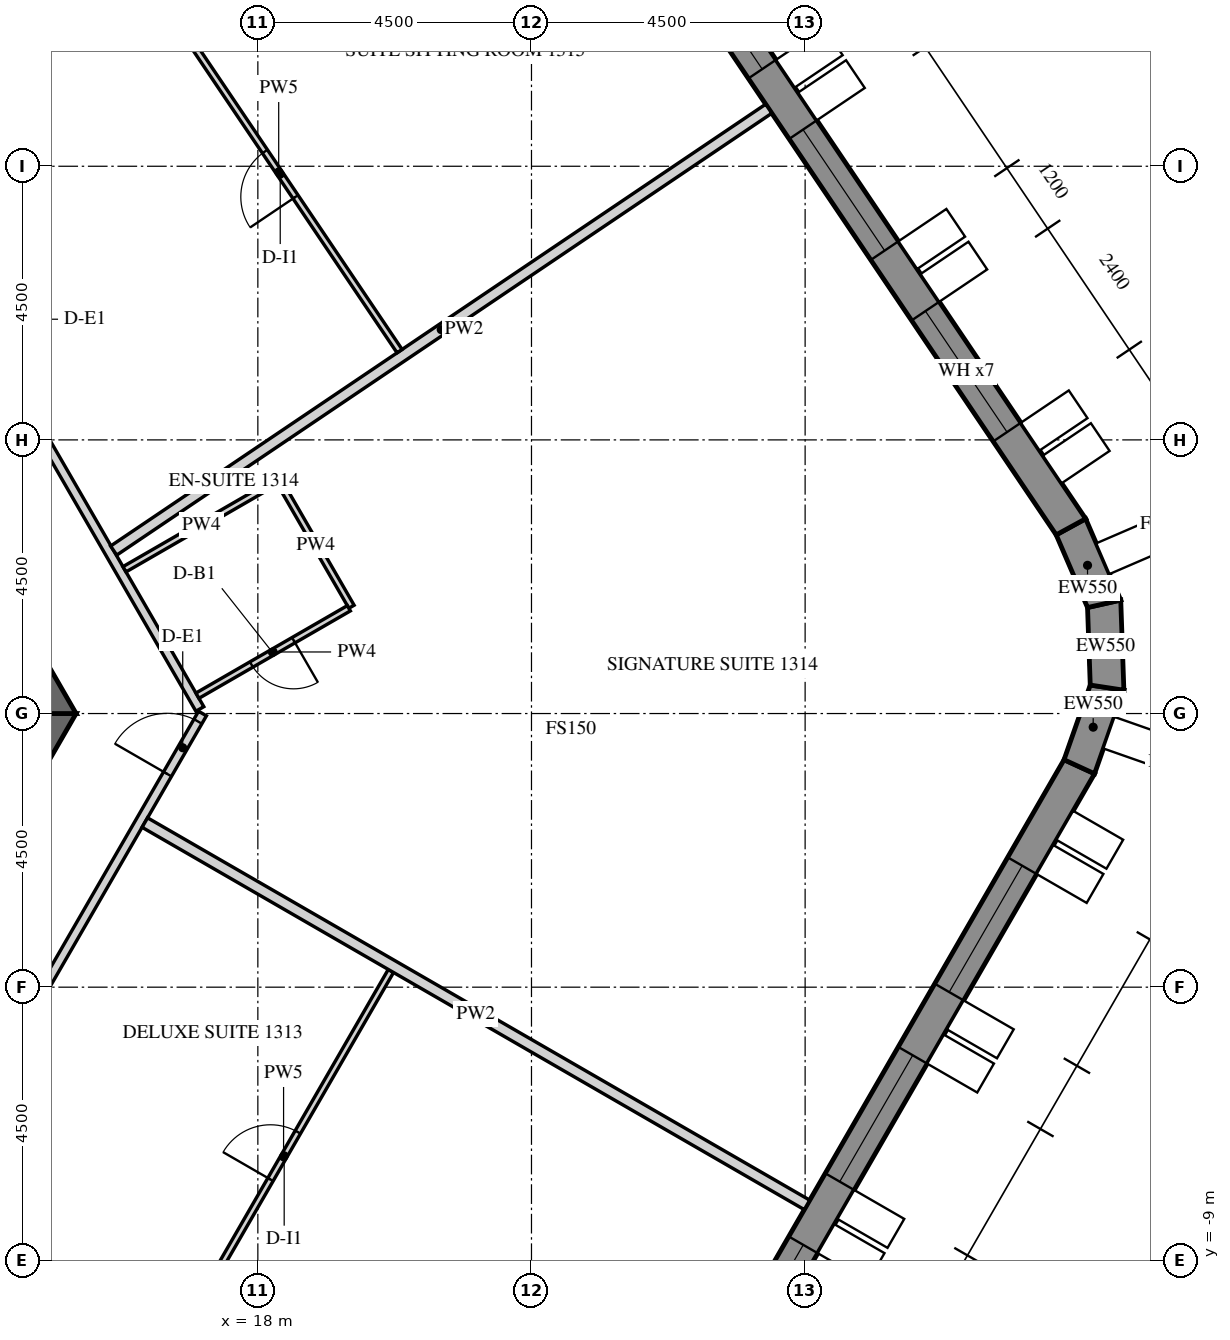
"""IFC4 building model, lengths in metres.
Left out: names, types, materials, properties, quantities, classifications, styles, units other than length and angle.
Written with IfcOpenShell. Run it as: python <this file> out.ifc"""

import sys

from ifc_helpers import new_model, si_unit, direction, frame, frame_2d, origin, place, context, subcontext, project, spatial, polyline, rectangle, outline, extrude, element, fill, save


model = new_model("IFC4")
c1 = context("Model", 3, precision=1e-05, world=origin(), true_north=direction((0.0, 1.0)))
c2 = subcontext(c1, "Body", "Model", "MODEL_VIEW")
j1 = project(units=[si_unit("LENGTHUNIT", "METRE"), si_unit("PLANEANGLEUNIT", "RADIAN")], contexts=[c1])
p1 = place(None, origin())
s1 = spatial("IfcSite", under=j1, at=p1, CompositionType="ELEMENT")
p2 = place(p1, origin())
s2 = spatial("IfcBuilding", under=s1, at=p2, CompositionType="ELEMENT")
p3 = place(p2, frame((0.0, 0.0, 176.1)))
s3 = spatial("IfcBuildingStorey", under=s2, at=p3, CompositionType="ELEMENT", Elevation=176.1)
p4 = place(p3, frame((17.63, -24.914, -0.15), z_axis=(0.0, 0.0, 1.0), x_axis=(0.499998569178, 0.866026229868, 0.0)))
e1 = element("IfcWall", 1, at=p4, inside=s3, PredefinedType="SOLIDWALL", context=c2, shape_type="SweptSolid", body=[
    extrude(outline(polyline([(-0.022, -0.275), (27.783, -0.275), (27.732, 0.275), (0.022, 0.275), (-0.022, -0.275)])), origin(), (0.0, 0.0, 1.0), 3.9),
])
p5 = place(p4, frame((1.879, 0.0, 1.05)))
e2 = element("IfcOpeningElement", 2, at=p5, cuts=e1, PredefinedType="OPENING", context=c2, shape_type="SweptSolid", body=[
    extrude(rectangle(XDim=2.4, YDim=2.4, at=frame_2d((1.2, 1.2))), frame((0.0, 0.285, 0.0), z_axis=(0.0, -1.0, 0.0), x_axis=(1.0, 0.0, 0.0)), (0.0, 0.0, 1.0), 0.57),
])
p6 = place(p4, frame((5.479, 0.0, 1.05)))
e3 = element("IfcOpeningElement", 3, at=p6, cuts=e1, PredefinedType="OPENING", context=c2, shape_type="SweptSolid", body=[
    extrude(rectangle(XDim=2.4, YDim=2.4, at=frame_2d((1.2, 1.2))), frame((0.0, 0.285, 0.0), z_axis=(0.0, -1.0, 0.0), x_axis=(1.0, 0.0, 0.0)), (0.0, 0.0, 1.0), 0.57),
])
p7 = place(p4, frame((9.079, 0.0, 1.05)))
e4 = element("IfcOpeningElement", 4, at=p7, cuts=e1, PredefinedType="OPENING", context=c2, shape_type="SweptSolid", body=[
    extrude(rectangle(XDim=2.4, YDim=2.4, at=frame_2d((1.2, 1.2))), frame((0.0, 0.285, 0.0), z_axis=(0.0, -1.0, 0.0), x_axis=(1.0, 0.0, 0.0)), (0.0, 0.0, 1.0), 0.57),
])
p8 = place(p4, frame((12.679, 0.0, 1.05)))
e5 = element("IfcOpeningElement", 5, at=p8, cuts=e1, PredefinedType="OPENING", context=c2, shape_type="SweptSolid", body=[
    extrude(rectangle(XDim=2.4, YDim=2.4, at=frame_2d((1.2, 1.2))), frame((0.0, 0.285, 0.0), z_axis=(0.0, -1.0, 0.0), x_axis=(1.0, 0.0, 0.0)), (0.0, 0.0, 1.0), 0.57),
])
p9 = place(p4, frame((16.279, 0.0, 1.05)))
e6 = element("IfcOpeningElement", 6, at=p9, cuts=e1, PredefinedType="OPENING", context=c2, shape_type="SweptSolid", body=[
    extrude(rectangle(XDim=2.4, YDim=2.4, at=frame_2d((1.2, 1.2))), frame((0.0, 0.285, 0.0), z_axis=(0.0, -1.0, 0.0), x_axis=(1.0, 0.0, 0.0)), (0.0, 0.0, 1.0), 0.57),
])
p10 = place(p4, frame((19.879, 0.0, 1.05)))
e7 = element("IfcOpeningElement", 7, at=p10, cuts=e1, PredefinedType="OPENING", context=c2, shape_type="SweptSolid", body=[
    extrude(rectangle(XDim=2.4, YDim=2.4, at=frame_2d((1.2, 1.2))), frame((0.0, 0.285, 0.0), z_axis=(0.0, -1.0, 0.0), x_axis=(1.0, 0.0, 0.0)), (0.0, 0.0, 1.0), 0.57),
])
p11 = place(p4, frame((23.479, 0.0, 1.05)))
e8 = element("IfcOpeningElement", 8, at=p11, cuts=e1, PredefinedType="OPENING", context=c2, shape_type="SweptSolid", body=[
    extrude(rectangle(XDim=2.4, YDim=2.4, at=frame_2d((1.2, 1.2))), frame((0.0, 0.285, 0.0), z_axis=(0.0, -1.0, 0.0), x_axis=(1.0, 0.0, 0.0)), (0.0, 0.0, 1.0), 0.57),
])
p12 = place(p3, frame((31.509, -0.875, -0.15), z_axis=(0.0, 0.0, 1.0), x_axis=(0.33111537203, 0.943590276765, 0.0)))
e9 = element("IfcWall", 9, at=p12, inside=s3, PredefinedType="SOLIDWALL", context=c2, shape_type="SweptSolid", body=[
    extrude(outline(polyline([(-0.026, -0.275), (1.431, -0.275), (1.327, 0.275), (0.026, 0.275), (-0.026, -0.275)])), origin(), (0.0, 0.0, 1.0), 3.9),
])
p13 = place(p3, frame((31.966, 0.426, -0.15), z_axis=(0.0, 0.0, 1.0), x_axis=(-0.034876908462, 0.999391615562, 0.0)))
e10 = element("IfcWall", 10, at=p13, inside=s3, PredefinedType="SOLIDWALL", context=c2, shape_type="SweptSolid", body=[
    extrude(outline(polyline([(-0.052, -0.275), (1.431, -0.275), (1.327, 0.275), (0.052, 0.275), (-0.052, -0.275)])), origin(), (0.0, 0.0, 1.0), 3.9),
])
p14 = place(p3, frame((31.917, 1.804, -0.15), z_axis=(0.0, 0.0, 1.0), x_axis=(-0.396225741392, 0.918153125496, 0.0)))
e11 = element("IfcWall", 11, at=p14, inside=s3, PredefinedType="SOLIDWALL", context=c2, shape_type="SweptSolid", body=[
    extrude(outline(polyline([(-0.052, -0.275), (1.405, -0.275), (1.353, 0.275), (0.052, 0.275), (-0.052, -0.275)])), origin(), (0.0, 0.0, 1.0), 3.9),
])
p15 = place(p3, frame((31.371, 3.071, -0.15), z_axis=(0.0, 0.0, 1.0), x_axis=(-0.559189891278, 0.829039604297, 0.0)))
e12 = element("IfcWall", 12, at=p15, inside=s3, PredefinedType="SOLIDWALL", context=c2, shape_type="SweptSolid", body=[
    extrude(outline(polyline([(-0.026, -0.275), (27.781, -0.275), (27.736, 0.275), (0.026, 0.275), (-0.026, -0.275)])), origin(), (0.0, 0.0, 1.0), 3.9),
])
p16 = place(p15, frame((1.879, 0.0, 1.05)))
e13 = element("IfcOpeningElement", 13, at=p16, cuts=e12, PredefinedType="OPENING", context=c2, shape_type="SweptSolid", body=[
    extrude(rectangle(XDim=2.4, YDim=2.4, at=frame_2d((1.2, 1.2))), frame((0.0, 0.285, 0.0), z_axis=(0.0, -1.0, 0.0), x_axis=(1.0, 0.0, 0.0)), (0.0, 0.0, 1.0), 0.57),
])
p17 = place(p15, frame((5.479, 0.0, 1.05)))
e14 = element("IfcOpeningElement", 14, at=p17, cuts=e12, PredefinedType="OPENING", context=c2, shape_type="SweptSolid", body=[
    extrude(rectangle(XDim=2.4, YDim=2.4, at=frame_2d((1.2, 1.2))), frame((0.0, 0.285, 0.0), z_axis=(0.0, -1.0, 0.0), x_axis=(1.0, 0.0, 0.0)), (0.0, 0.0, 1.0), 0.57),
])
p18 = place(p15, frame((9.079, 0.0, 1.05)))
e15 = element("IfcOpeningElement", 15, at=p18, cuts=e12, PredefinedType="OPENING", context=c2, shape_type="SweptSolid", body=[
    extrude(rectangle(XDim=2.4, YDim=2.4, at=frame_2d((1.2, 1.2))), frame((0.0, 0.285, 0.0), z_axis=(0.0, -1.0, 0.0), x_axis=(1.0, 0.0, 0.0)), (0.0, 0.0, 1.0), 0.57),
])
p19 = place(p15, frame((12.679, 0.0, 1.05)))
e16 = element("IfcOpeningElement", 16, at=p19, cuts=e12, PredefinedType="OPENING", context=c2, shape_type="SweptSolid", body=[
    extrude(rectangle(XDim=2.4, YDim=2.4, at=frame_2d((1.2, 1.2))), frame((0.0, 0.285, 0.0), z_axis=(0.0, -1.0, 0.0), x_axis=(1.0, 0.0, 0.0)), (0.0, 0.0, 1.0), 0.57),
])
p20 = place(p15, frame((16.279, 0.0, 1.05)))
e17 = element("IfcOpeningElement", 17, at=p20, cuts=e12, PredefinedType="OPENING", context=c2, shape_type="SweptSolid", body=[
    extrude(rectangle(XDim=2.4, YDim=2.4, at=frame_2d((1.2, 1.2))), frame((0.0, 0.285, 0.0), z_axis=(0.0, -1.0, 0.0), x_axis=(1.0, 0.0, 0.0)), (0.0, 0.0, 1.0), 0.57),
])
p21 = place(p15, frame((19.879, 0.0, 1.05)))
e18 = element("IfcOpeningElement", 18, at=p21, cuts=e12, PredefinedType="OPENING", context=c2, shape_type="SweptSolid", body=[
    extrude(rectangle(XDim=2.4, YDim=2.4, at=frame_2d((1.2, 1.2))), frame((0.0, 0.285, 0.0), z_axis=(0.0, -1.0, 0.0), x_axis=(1.0, 0.0, 0.0)), (0.0, 0.0, 1.0), 0.57),
])
p22 = place(p15, frame((23.479, 0.0, 1.05)))
e19 = element("IfcOpeningElement", 19, at=p22, cuts=e12, PredefinedType="OPENING", context=c2, shape_type="SweptSolid", body=[
    extrude(rectangle(XDim=2.4, YDim=2.4, at=frame_2d((1.2, 1.2))), frame((0.0, 0.285, 0.0), z_axis=(0.0, -1.0, 0.0), x_axis=(1.0, 0.0, 0.0)), (0.0, 0.0, 1.0), 0.57),
])
p23 = place(p3, frame((7.361, -12.75, -0.15), z_axis=(0.0, 0.0, 1.0), x_axis=(0.50000571537, 0.866022103989, 0.0)))
e20 = element("IfcWall", 20, at=p23, inside=s3, PredefinedType="SHEAR", context=c2, shape_type="SweptSolid", body=[
    extrude(outline(polyline([(-0.144, -0.25), (14.867, -0.25), (14.578, 0.25), (0.144, 0.25), (-0.144, -0.25)])), origin(), (0.0, 0.0, 1.0), 3.9),
])
p24 = place(p23, frame((6.49, 0.0, 0.15)))
e21 = element("IfcOpeningElement", 21, at=p24, cuts=e20, PredefinedType="OPENING", context=c2, shape_type="SweptSolid", body=[
    extrude(rectangle(XDim=1.8, YDim=2.4, at=frame_2d((0.9, 1.2))), frame((0.0, 0.26, 0.0), z_axis=(0.0, -1.0, 0.0), x_axis=(1.0, 0.0, 0.0)), (0.0, 0.0, 1.0), 0.52),
])
p25 = place(p3, frame((14.722, 0.0, -0.15), z_axis=(0.0, 0.0, 1.0), x_axis=(-0.50000571537, 0.866022103989, 0.0)))
e22 = element("IfcWall", 22, at=p25, inside=s3, PredefinedType="SHEAR", context=c2, shape_type="SweptSolid", body=[
    extrude(outline(polyline([(-0.144, -0.25), (14.867, -0.25), (14.578, 0.25), (0.144, 0.25), (-0.144, -0.25)])), origin(), (0.0, 0.0, 1.0), 3.9),
])
p26 = place(p25, frame((6.432, 0.0, 0.15)))
e23 = element("IfcOpeningElement", 23, at=p26, cuts=e22, PredefinedType="OPENING", context=c2, shape_type="SweptSolid", body=[
    extrude(rectangle(XDim=1.8, YDim=2.4, at=frame_2d((0.9, 1.2))), frame((0.0, 0.26, 0.0), z_axis=(0.0, -1.0, 0.0), x_axis=(1.0, 0.0, 0.0)), (0.0, 0.0, 1.0), 0.52),
])
p27 = place(p3, frame((10.714, -11.043, 0.0), z_axis=(0.0, 0.0, 1.0), x_axis=(0.500001980452, 0.866024260367, 0.0)))
e24 = element("IfcWall", 24, at=p27, inside=s3, PredefinedType="PARTITIONING", context=c2, shape_type="SweptSolid", body=[
    extrude(rectangle(XDim=12.752, YDim=0.15, at=frame_2d((6.376, 0.0))), origin(), (0.0, 0.0, 1.0), 2.988),
])
p28 = place(p27, frame((6.125, 0.0, 0.0)))
e25 = element("IfcOpeningElement", 25, at=p28, cuts=e24, PredefinedType="OPENING", context=c2, shape_type="SweptSolid", body=[
    extrude(rectangle(XDim=1.0, YDim=2.1, at=frame_2d((0.5, 1.05))), frame((0.0, 0.085, 0.0), z_axis=(0.0, -1.0, 0.0), x_axis=(1.0, 0.0, 0.0)), (0.0, 0.0, 1.0), 0.17),
])
p29 = place(p27, frame((11.602, 0.0, 0.0)))
e26 = element("IfcOpeningElement", 26, at=p29, cuts=e24, PredefinedType="OPENING", context=c2, shape_type="SweptSolid", body=[
    extrude(rectangle(XDim=1.0, YDim=2.1, at=frame_2d((0.5, 1.05))), frame((0.0, 0.085, 0.0), z_axis=(0.0, -1.0, 0.0), x_axis=(1.0, 0.0, 0.0)), (0.0, 0.0, 1.0), 0.17),
])
p30 = place(p3, frame((17.046, 0.075, 0.0), z_axis=(0.0, 0.0, 1.0), x_axis=(-0.499999403554, 0.866025748143, 0.0)))
e27 = element("IfcWall", 27, at=p30, inside=s3, PredefinedType="PARTITIONING", context=c2, shape_type="SweptSolid", body=[
    extrude(rectangle(XDim=14.549, YDim=0.15, at=frame_2d((7.275, 0.0))), origin(), (0.0, 0.0, 1.0), 2.988),
])
p31 = place(p30, frame((6.901, 0.0, 0.0)))
e28 = element("IfcOpeningElement", 28, at=p31, cuts=e27, PredefinedType="OPENING", context=c2, shape_type="SweptSolid", body=[
    extrude(rectangle(XDim=1.0, YDim=2.1, at=frame_2d((0.5, 1.05))), frame((0.0, 0.085, 0.0), z_axis=(0.0, -1.0, 0.0), x_axis=(1.0, 0.0, 0.0)), (0.0, 0.0, 1.0), 0.17),
])
p32 = place(p3, frame((16.658, -10.347, 0.0), z_axis=(0.0, 0.0, 1.0), x_axis=(0.500010820671, 0.866019156377, 0.0)))
e29 = element("IfcWall", 29, at=p32, inside=s3, PredefinedType="PARTITIONING", context=c2, shape_type="SweptSolid", body=[
    extrude(rectangle(XDim=7.06, YDim=0.1, at=frame_2d((3.53, 0.0))), origin(), (0.0, 0.0, 1.0), 2.988),
])
p33 = place(p32, frame((3.1, 0.0, 0.0)))
e30 = element("IfcOpeningElement", 30, at=p33, cuts=e29, PredefinedType="OPENING", context=c2, shape_type="SweptSolid", body=[
    extrude(rectangle(XDim=0.9, YDim=2.1, at=frame_2d((0.45, 1.05))), frame((0.0, 0.06, 0.0), z_axis=(0.0, -1.0, 0.0), x_axis=(1.0, 0.0, 0.0)), (0.0, 0.0, 1.0), 0.12),
])
p34 = place(p3, frame((27.031, -8.08, 0.0), z_axis=(0.0, 0.0, 1.0), x_axis=(-0.86602780907, 0.499995833901, 0.0)))
e31 = element("IfcWall", 31, at=p34, inside=s3, PredefinedType="PARTITIONING", context=c2, shape_type="SweptSolid", body=[
    extrude(rectangle(XDim=12.575, YDim=0.18, at=frame_2d((6.287, 0.0))), origin(), (0.0, 0.0, 1.0), 2.988),
])
p35 = place(p3, frame((15.807, 2.372, 0.0), z_axis=(0.0, 0.0, 1.0), x_axis=(0.86601045545, 0.500025890382, 0.0)))
e32 = element("IfcWall", 32, at=p35, inside=s3, PredefinedType="PARTITIONING", context=c2, shape_type="SweptSolid", body=[
    extrude(rectangle(XDim=2.925, YDim=0.1, at=frame_2d((1.462, 0.0))), origin(), (0.0, 0.0, 1.0), 2.988),
])
p36 = place(p3, frame((18.365, 3.791, 0.0), z_axis=(0.0, 0.0, 1.0), x_axis=(0.500016218704, -0.866016039709, 0.0)))
e33 = element("IfcWall", 33, at=p36, inside=s3, PredefinedType="PARTITIONING", context=c2, shape_type="SweptSolid", body=[
    extrude(rectangle(XDim=2.35, YDim=0.1, at=frame_2d((1.175, 0.0))), origin(), (0.0, 0.0, 1.0), 2.988),
])
p37 = place(p3, frame((19.496, 1.731, 0.0), z_axis=(0.0, 0.0, 1.0), x_axis=(-0.866018712932, -0.500011588718, 0.0)))
e34 = element("IfcWall", 34, at=p37, inside=s3, PredefinedType="PARTITIONING", context=c2, shape_type="SweptSolid", body=[
    extrude(rectangle(XDim=2.875, YDim=0.1, at=frame_2d((1.438, 0.0))), origin(), (0.0, 0.0, 1.0), 2.988),
])
p38 = place(p37, frame((1.05, 0.0, 0.0)))
e35 = element("IfcOpeningElement", 35, at=p38, cuts=e34, PredefinedType="OPENING", context=c2, shape_type="SweptSolid", body=[
    extrude(rectangle(XDim=0.8, YDim=2.1, at=frame_2d((0.4, 1.05))), frame((0.0, 0.06, 0.0), z_axis=(0.0, -1.0, 0.0), x_axis=(1.0, 0.0, 0.0)), (0.0, 0.0, 1.0), 0.12),
])
p39 = place(p3, frame((26.402, 9.946, 0.0), z_axis=(0.0, 0.0, 1.0), x_axis=(-0.829032022697, -0.559201131386, 0.0)))
e36 = element("IfcWall", 36, at=p39, inside=s3, PredefinedType="PARTITIONING", context=c2, shape_type="SweptSolid", body=[
    extrude(rectangle(XDim=12.995, YDim=0.18, at=frame_2d((6.497, 0.0))), origin(), (0.0, 0.0, 1.0), 2.988),
])
p40 = place(p3, frame((20.331, 5.96, 0.0), z_axis=(0.0, 0.0, 1.0), x_axis=(-0.559185029686, 0.829042883435, 0.0)))
e37 = element("IfcWall", 37, at=p40, inside=s3, PredefinedType="PARTITIONING", context=c2, shape_type="SweptSolid", body=[
    extrude(rectangle(XDim=7.11, YDim=0.1, at=frame_2d((3.555, 0.0))), origin(), (0.0, 0.0, 1.0), 2.988),
])
p41 = place(p40, frame((3.06, 0.0, 0.0)))
e38 = element("IfcOpeningElement", 38, at=p41, cuts=e37, PredefinedType="OPENING", context=c2, shape_type="SweptSolid", body=[
    extrude(rectangle(XDim=0.9, YDim=2.1, at=frame_2d((0.45, 1.05))), frame((0.0, 0.06, 0.0), z_axis=(0.0, -1.0, 0.0), x_axis=(1.0, 0.0, 0.0)), (0.0, 0.0, 1.0), 0.12),
])
p42 = place(p9, frame((0.0, 0.205, 0.0)))
e39 = element("IfcWindow", 39, at=p42, inside=s3, PartitioningType="DOUBLE_PANEL_VERTICAL", PredefinedType="WINDOW", context=c2, shape_type="SweptSolid", body=[
    extrude(rectangle(XDim=2.4, YDim=2.4, at=frame_2d((1.2, 1.2))), frame((0.0, 0.03, 0.0), z_axis=(0.0, -1.0, 0.0), x_axis=(1.0, 0.0, 0.0)), (0.0, 0.0, 1.0), 0.06),
])
fill(e6, e39)
p43 = place(p10, frame((0.0, 0.205, 0.0)))
e40 = element("IfcWindow", 40, at=p43, inside=s3, PartitioningType="DOUBLE_PANEL_VERTICAL", PredefinedType="WINDOW", context=c2, shape_type="SweptSolid", body=[
    extrude(rectangle(XDim=2.4, YDim=2.4, at=frame_2d((1.2, 1.2))), frame((0.0, 0.03, 0.0), z_axis=(0.0, -1.0, 0.0), x_axis=(1.0, 0.0, 0.0)), (0.0, 0.0, 1.0), 0.06),
])
fill(e7, e40)
p44 = place(p11, frame((0.0, 0.205, 0.0)))
e41 = element("IfcWindow", 41, at=p44, inside=s3, PartitioningType="DOUBLE_PANEL_VERTICAL", PredefinedType="WINDOW", context=c2, shape_type="SweptSolid", body=[
    extrude(rectangle(XDim=2.4, YDim=2.4, at=frame_2d((1.2, 1.2))), frame((0.0, 0.03, 0.0), z_axis=(0.0, -1.0, 0.0), x_axis=(1.0, 0.0, 0.0)), (0.0, 0.0, 1.0), 0.06),
])
fill(e8, e41)
p45 = place(p16, frame((0.0, 0.205, 0.0)))
e42 = element("IfcWindow", 42, at=p45, inside=s3, PartitioningType="DOUBLE_PANEL_VERTICAL", PredefinedType="WINDOW", context=c2, shape_type="SweptSolid", body=[
    extrude(rectangle(XDim=2.4, YDim=2.4, at=frame_2d((1.2, 1.2))), frame((0.0, 0.03, 0.0), z_axis=(0.0, -1.0, 0.0), x_axis=(1.0, 0.0, 0.0)), (0.0, 0.0, 1.0), 0.06),
])
fill(e13, e42)
p46 = place(p17, frame((0.0, 0.205, 0.0)))
e43 = element("IfcWindow", 43, at=p46, inside=s3, PartitioningType="DOUBLE_PANEL_VERTICAL", PredefinedType="WINDOW", context=c2, shape_type="SweptSolid", body=[
    extrude(rectangle(XDim=2.4, YDim=2.4, at=frame_2d((1.2, 1.2))), frame((0.0, 0.03, 0.0), z_axis=(0.0, -1.0, 0.0), x_axis=(1.0, 0.0, 0.0)), (0.0, 0.0, 1.0), 0.06),
])
fill(e14, e43)
p47 = place(p18, frame((0.0, 0.205, 0.0)))
e44 = element("IfcWindow", 44, at=p47, inside=s3, PartitioningType="DOUBLE_PANEL_VERTICAL", PredefinedType="WINDOW", context=c2, shape_type="SweptSolid", body=[
    extrude(rectangle(XDim=2.4, YDim=2.4, at=frame_2d((1.2, 1.2))), frame((0.0, 0.03, 0.0), z_axis=(0.0, -1.0, 0.0), x_axis=(1.0, 0.0, 0.0)), (0.0, 0.0, 1.0), 0.06),
])
fill(e15, e44)
p48 = place(p33, origin())
e45 = element("IfcDoor", 45, at=p48, inside=s3, OperationType="SINGLE_SWING_RIGHT", PredefinedType="DOOR", context=c2, shape_type="SweptSolid", body=[
    extrude(rectangle(XDim=0.9, YDim=2.1, at=frame_2d((0.45, 1.05))), frame((0.0, 0.025, 0.0), z_axis=(0.0, -1.0, 0.0), x_axis=(1.0, 0.0, 0.0)), (0.0, 0.0, 1.0), 0.05),
])
fill(e30, e45)
p49 = place(p29, origin())
e46 = element("IfcDoor", 46, at=p49, inside=s3, OperationType="SINGLE_SWING_LEFT", PredefinedType="DOOR", context=c2, shape_type="SweptSolid", body=[
    extrude(rectangle(XDim=1.0, YDim=2.1, at=frame_2d((0.5, 1.05))), frame((0.0, 0.025, 0.0), z_axis=(0.0, -1.0, 0.0), x_axis=(1.0, 0.0, 0.0)), (0.0, 0.0, 1.0), 0.05),
])
fill(e26, e46)
p50 = place(p38, origin())
e47 = element("IfcDoor", 47, at=p50, inside=s3, OperationType="SINGLE_SWING_LEFT", PredefinedType="DOOR", context=c2, shape_type="SweptSolid", body=[
    extrude(rectangle(XDim=0.8, YDim=2.1, at=frame_2d((0.4, 1.05))), frame((0.0, 0.025, 0.0), z_axis=(0.0, -1.0, 0.0), x_axis=(1.0, 0.0, 0.0)), (0.0, 0.0, 1.0), 0.05),
])
fill(e35, e47)
p51 = place(p41, origin())
e48 = element("IfcDoor", 48, at=p51, inside=s3, OperationType="SINGLE_SWING_RIGHT", PredefinedType="DOOR", context=c2, shape_type="SweptSolid", body=[
    extrude(rectangle(XDim=0.9, YDim=2.1, at=frame_2d((0.45, 1.05))), frame((0.0, 0.025, 0.0), z_axis=(0.0, -1.0, 0.0), x_axis=(1.0, 0.0, 0.0)), (0.0, 0.0, 1.0), 0.05),
])
fill(e38, e48)
save(model, sys.argv[1])
